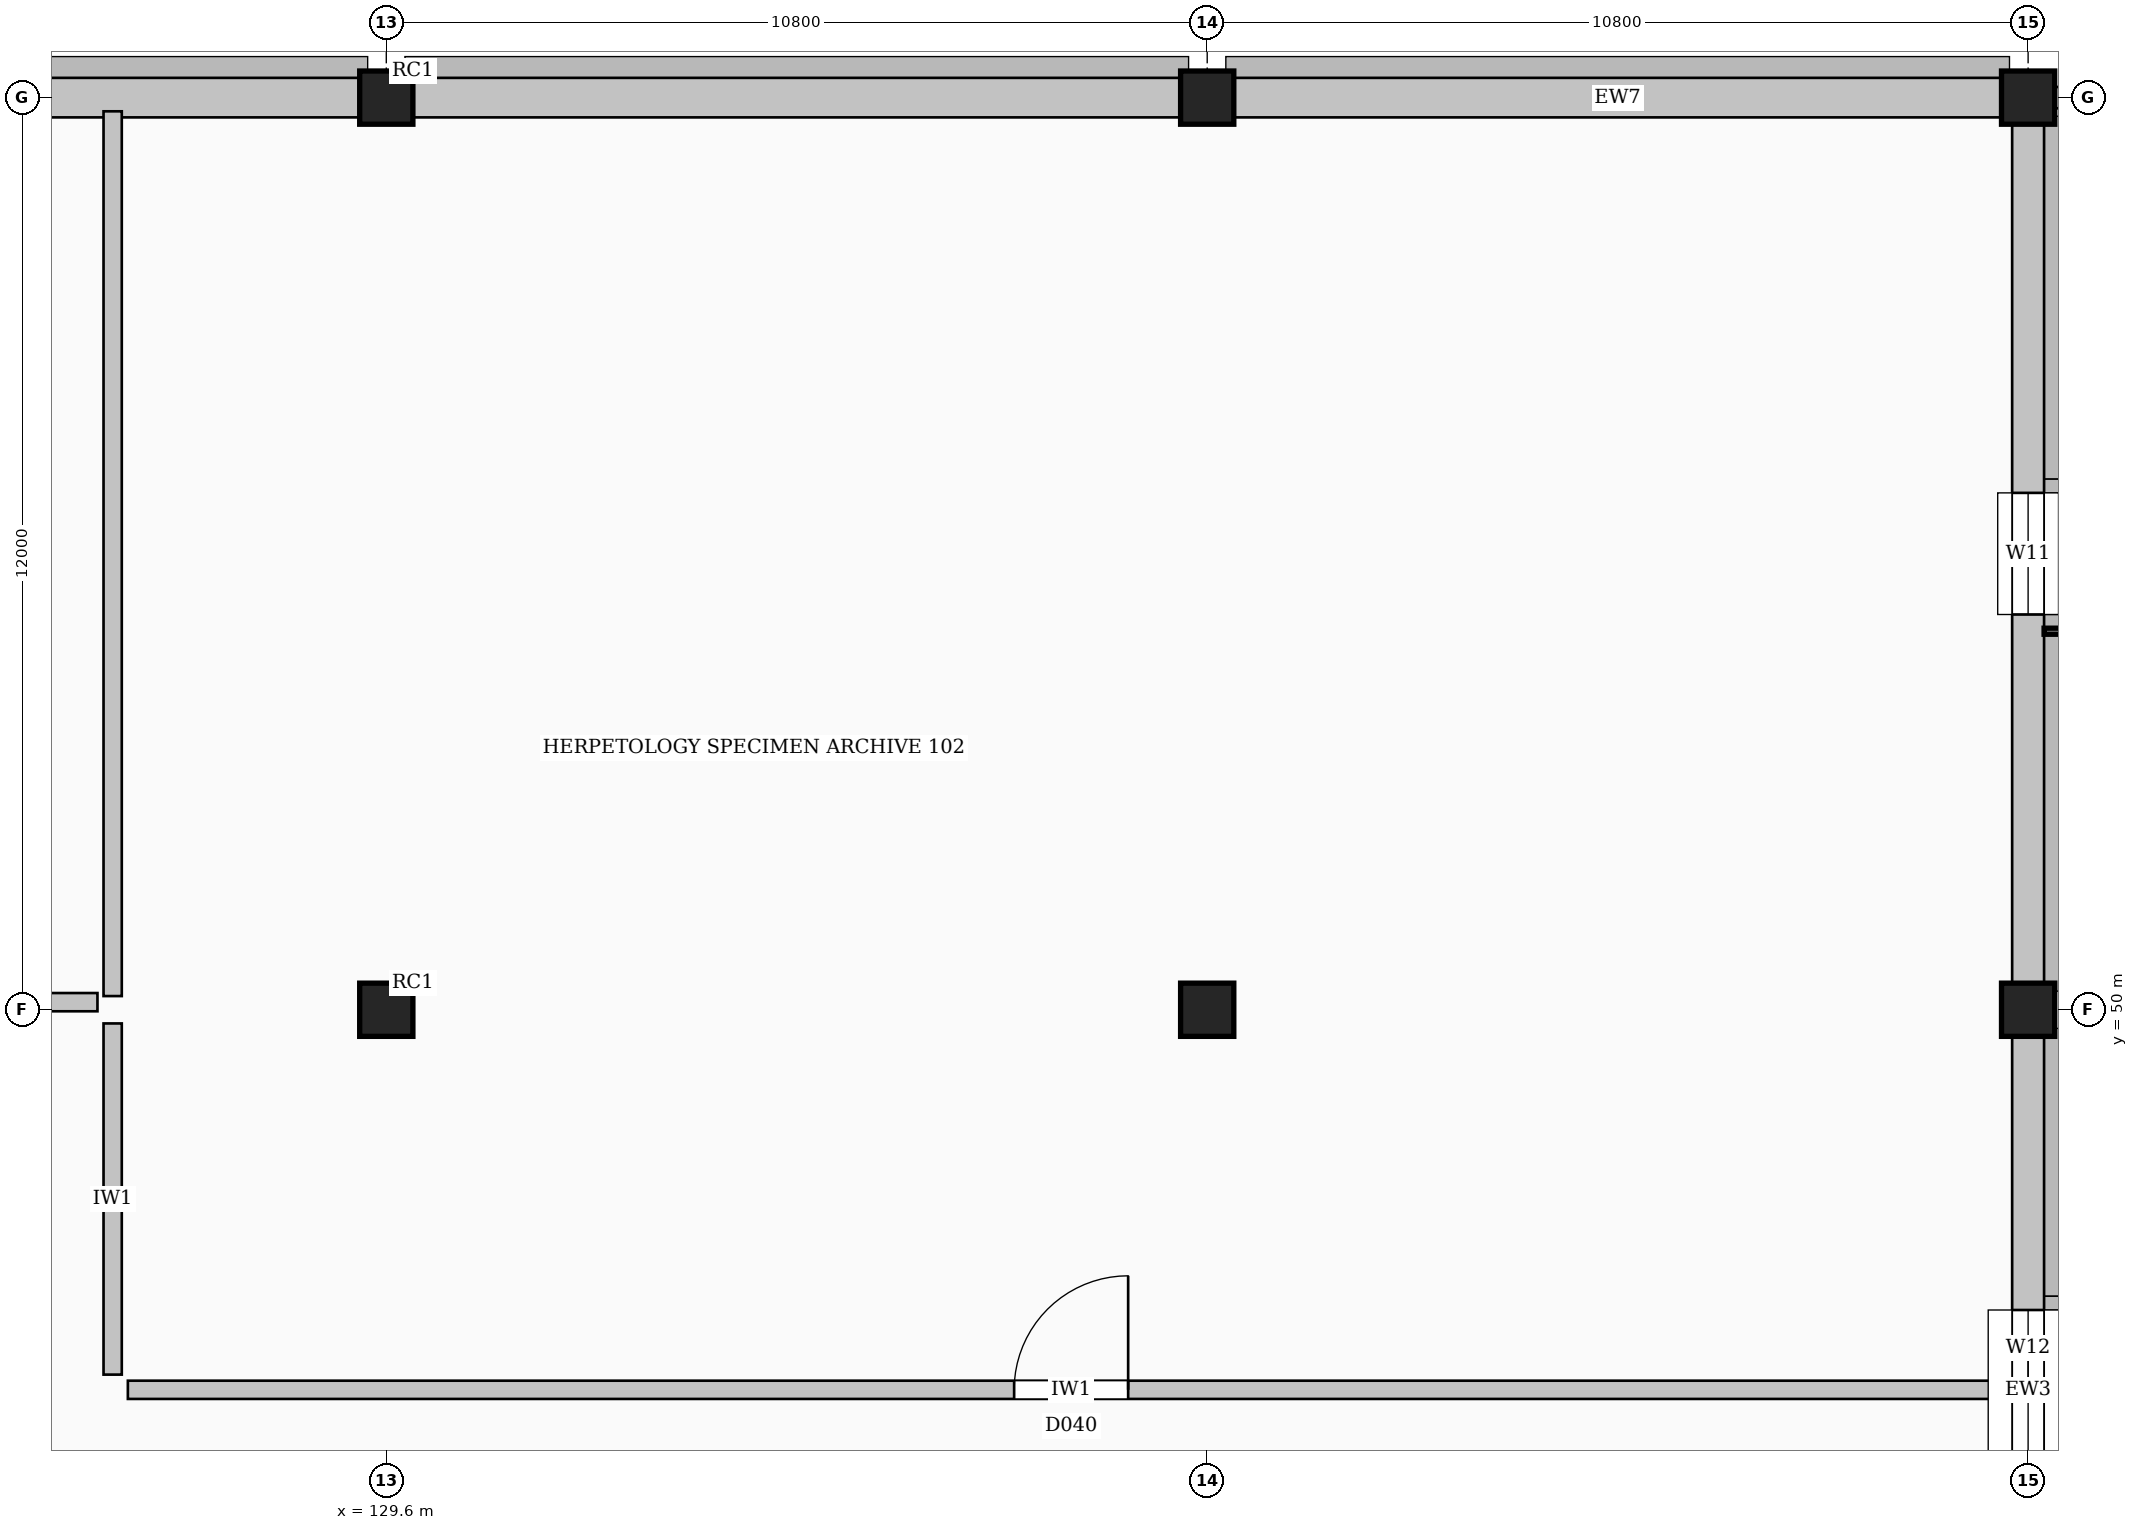
"""IFC4 building model, lengths in metres.
Left out: names, types, materials, properties, quantities, classifications, styles, units other than length and angle.
Written with IfcOpenShell. Run it as: python <this file> out.ifc"""

import sys

from ifc_helpers import new_model, si_unit, direction, frame, frame_2d, origin, origin_2d, place, context, subcontext, project, spatial, polyline, rectangle, outline, extrude, element, fill, save


model = new_model("IFC4")
c1 = context("Model", 3, precision=1e-05, world=origin(), true_north=direction((0.0, 1.0)))
c2 = subcontext(c1, "Body", "Model", "MODEL_VIEW")
j1 = project(units=[si_unit("LENGTHUNIT", "METRE"), si_unit("PLANEANGLEUNIT", "RADIAN")], contexts=[c1])
p1 = place(None, origin())
s1 = spatial("IfcSite", under=j1, at=p1, CompositionType="ELEMENT")
p2 = place(p1, origin())
s2 = spatial("IfcBuilding", under=s1, at=p2, CompositionType="ELEMENT")
p3 = place(p2, frame((0.0, 0.0, 4.8)))
s3 = spatial("IfcBuildingStorey", under=s2, at=p3, CompositionType="ELEMENT", Elevation=4.8)
for number, where, z_axis, x_axis in (
    (1, (129.6, 50.0, 0.0), (0.0, 0.0, 1.0), (1.0, 0.0, 0.0)),
    (2, (129.6, 62.0, 0.0), (0.0, 0.0, 1.0), (1.0, 0.0, 0.0)),
    (3, (140.4, 50.0, 0.0), (0.0, 0.0, 1.0), (1.0, 0.0, 0.0)),
    (4, (140.4, 62.0, 0.0), (0.0, 0.0, 1.0), (1.0, 0.0, 0.0)),
    (5, (151.2, 50.0, 0.0), (0.0, 0.0, 1.0), (1.0, 0.0, 0.0)),
    (6, (151.2, 62.0, 0.0), (0.0, 0.0, 1.0), (1.0, 0.0, 0.0)),
):
    element("IfcColumn", number, at=place(p3, frame(where, z_axis=z_axis, x_axis=x_axis)), inside=s3, PredefinedType="COLUMN", context=c2, shape_type="SweptSolid", body=[
        extrude(rectangle(XDim=0.7, YDim=0.7, at=origin_2d()), origin(), (0.0, 0.0, 1.0), 4.8),
    ])
p4 = place(p3, frame((151.2, 40.145, 0.0), z_axis=(0.0, 0.0, 1.0), x_axis=(0.0, 1.0, 0.0)))
e7 = element("IfcWall", 7, at=p4, inside=s3, PredefinedType="STANDARD", context=c2, shape_type="SweptSolid", body=[
    extrude(rectangle(XDim=9.71, YDim=0.42, at=frame_2d((4.855, 0.0))), origin(), (0.0, 0.0, 1.0), 4.13),
])
p5 = place(p4, frame((3.805, 0.0, 1.2)))
e8 = element("IfcOpeningElement", 8, at=p5, cuts=e7, PredefinedType="OPENING", context=c2, shape_type="SweptSolid", body=[
    extrude(rectangle(XDim=2.1, YDim=1.6, at=frame_2d((1.05, 0.8))), frame((0.0, 0.22, 0.0), z_axis=(0.0, -1.0, 0.0), x_axis=(1.0, 0.0, 0.0)), (0.0, 0.0, 1.0), 0.44),
])
p6 = place(p3, frame((151.2, 50.145, 0.0), z_axis=(0.0, 0.0, 1.0), x_axis=(0.0, 1.0, 0.0)))
e9 = element("IfcWall", 9, at=p6, inside=s3, PredefinedType="STANDARD", context=c2, shape_type="SweptSolid", body=[
    extrude(rectangle(XDim=11.71, YDim=0.42, at=frame_2d((5.855, 0.0))), origin(), (0.0, 0.0, 1.0), 4.13),
])
p7 = place(p6, frame((5.055, 0.0, 1.2)))
e10 = element("IfcOpeningElement", 10, at=p7, cuts=e9, PredefinedType="OPENING", context=c2, shape_type="SweptSolid", body=[
    extrude(rectangle(XDim=1.6, YDim=1.8, at=frame_2d((0.8, 0.9))), frame((0.0, 0.22, 0.0), z_axis=(0.0, -1.0, 0.0), x_axis=(1.0, 0.0, 0.0)), (0.0, 0.0, 1.0), 0.44),
])
p8 = place(p3, frame((151.055, 62.0, 0.0), z_axis=(0.0, 0.0, 1.0), x_axis=(-1.0, 0.0, 0.0)))
e11 = element("IfcWall", 11, at=p8, inside=s3, PredefinedType="SOLIDWALL", context=c2, shape_type="SweptSolid", body=[
    extrude(rectangle(XDim=10.51, YDim=0.52, at=frame_2d((5.255, 0.0))), origin(), (0.0, 0.0, 1.0), 4.13),
])
p9 = place(p3, frame((140.255, 62.0, 0.0), z_axis=(0.0, 0.0, 1.0), x_axis=(-1.0, 0.0, 0.0)))
e12 = element("IfcWall", 12, at=p9, inside=s3, PredefinedType="SOLIDWALL", context=c2, shape_type="SweptSolid", body=[
    extrude(rectangle(XDim=10.51, YDim=0.52, at=frame_2d((5.255, 0.0))), origin(), (0.0, 0.0, 1.0), 3.83),
])
p10 = place(p3, frame((129.455, 62.0, 0.0), z_axis=(0.0, 0.0, 1.0), x_axis=(-1.0, 0.0, 0.0)))
e13 = element("IfcWall", 13, at=p10, inside=s3, PredefinedType="SOLIDWALL", context=c2, shape_type="SweptSolid", body=[
    extrude(rectangle(XDim=10.51, YDim=0.52, at=frame_2d((5.255, 0.0))), origin(), (0.0, 0.0, 1.0), 3.83),
])
p11 = place(p3, frame((151.55, 62.0, -0.02), z_axis=(0.0, 0.0, 1.0), x_axis=(1.0, 0.0, 0.0)))
e14 = element("IfcWall", 14, at=p11, inside=s3, PredefinedType="STANDARD", context=c2, shape_type="SweptSolid", body=[
    extrude(outline(polyline([(0.0, 0.0), (10.25, 0.0), (10.25, 0.04), (0.0, 1.12), (0.0, 0.0)])), frame((0.0, 0.14, 0.0), z_axis=(0.0, -1.0, 0.0), x_axis=(1.0, 0.0, 0.0)), (0.0, 0.0, 1.0), 0.28),
])
p12 = place(p3, frame((126.2, 45.0, 0.0), z_axis=(0.0, 0.0, 1.0), x_axis=(1.0, 0.0, 0.0)))
e15 = element("IfcWall", 15, at=p12, inside=s3, PredefinedType="SOLIDWALL", context=c2, shape_type="SweptSolid", body=[
    extrude(rectangle(XDim=24.82, YDim=0.24, at=frame_2d((12.41, 0.0))), origin(), (0.0, 0.0, 1.0), 4.52),
])
p13 = place(p12, frame((11.66, 0.0, 0.0)))
e16 = element("IfcOpeningElement", 16, at=p13, cuts=e15, PredefinedType="OPENING", context=c2, shape_type="SweptSolid", body=[
    extrude(rectangle(XDim=1.5, YDim=2.4, at=frame_2d((0.75, 1.2))), frame((0.0, 0.13, 0.0), z_axis=(0.0, -1.0, 0.0), x_axis=(1.0, 0.0, 0.0)), (0.0, 0.0, 1.0), 0.26),
])
p14 = place(p3, frame((118.98, 50.1, 0.0), z_axis=(0.0, 0.0, 1.0), x_axis=(1.0, 0.0, 0.0)))
e17 = element("IfcWall", 17, at=p14, inside=s3, PredefinedType="SOLIDWALL", context=c2, shape_type="SweptSolid", body=[
    extrude(rectangle(XDim=6.82, YDim=0.24, at=frame_2d((3.41, 0.0))), origin(), (0.0, 0.0, 1.0), 3.83),
])
p15 = place(p14, frame((2.66, 0.0, 0.0)))
e18 = element("IfcOpeningElement", 18, at=p15, cuts=e17, PredefinedType="OPENING", context=c2, shape_type="SweptSolid", body=[
    extrude(rectangle(XDim=1.5, YDim=2.4, at=frame_2d((0.75, 1.2))), frame((0.0, 0.13, 0.0), z_axis=(0.0, -1.0, 0.0), x_axis=(1.0, 0.0, 0.0)), (0.0, 0.0, 1.0), 0.26),
])
p16 = place(p3, frame((126.0, 45.2, 0.0), z_axis=(0.0, 0.0, 1.0), x_axis=(0.0, 1.0, 0.0)))
e19 = element("IfcWall", 19, at=p16, inside=s3, PredefinedType="SOLIDWALL", context=c2, shape_type="SweptSolid", body=[
    extrude(rectangle(XDim=4.62, YDim=0.24, at=frame_2d((2.31, 0.0))), origin(), (0.0, 0.0, 1.0), 4.069),
])
p17 = place(p3, frame((126.0, 50.18, 0.0), z_axis=(0.0, 0.0, 1.0), x_axis=(0.0, 1.0, 0.0)))
e20 = element("IfcWall", 20, at=p17, inside=s3, PredefinedType="SOLIDWALL", context=c2, shape_type="SweptSolid", body=[
    extrude(rectangle(XDim=11.64, YDim=0.24, at=frame_2d((5.82, 0.0))), origin(), (0.0, 0.0, 1.0), 4.069),
])
p18 = place(p5, origin())
e21 = element("IfcWindow", 21, at=p18, inside=s3, PartitioningType="SINGLE_PANEL", PredefinedType="WINDOW", context=c2, shape_type="SweptSolid", body=[
    extrude(rectangle(XDim=2.1, YDim=1.6, at=frame_2d((1.05, 0.8))), frame((0.0, 0.03, 0.0), z_axis=(0.0, -1.0, 0.0), x_axis=(1.0, 0.0, 0.0)), (0.0, 0.0, 1.0), 0.06),
])
fill(e8, e21)
p19 = place(p7, origin())
e22 = element("IfcWindow", 22, at=p19, inside=s3, PartitioningType="SINGLE_PANEL", PredefinedType="WINDOW", context=c2, shape_type="SweptSolid", body=[
    extrude(rectangle(XDim=1.6, YDim=1.8, at=frame_2d((0.8, 0.9))), frame((0.0, 0.03, 0.0), z_axis=(0.0, -1.0, 0.0), x_axis=(1.0, 0.0, 0.0)), (0.0, 0.0, 1.0), 0.06),
])
fill(e10, e22)
p20 = place(p13, origin())
e23 = element("IfcDoor", 23, at=p20, inside=s3, OperationType="SINGLE_SWING_RIGHT", PredefinedType="DOOR", context=c2, shape_type="SweptSolid", body=[
    extrude(rectangle(XDim=1.5, YDim=2.4, at=frame_2d((0.75, 1.2))), frame((0.0, 0.025, 0.0), z_axis=(0.0, -1.0, 0.0), x_axis=(1.0, 0.0, 0.0)), (0.0, 0.0, 1.0), 0.05),
])
fill(e16, e23)
save(model, sys.argv[1])
